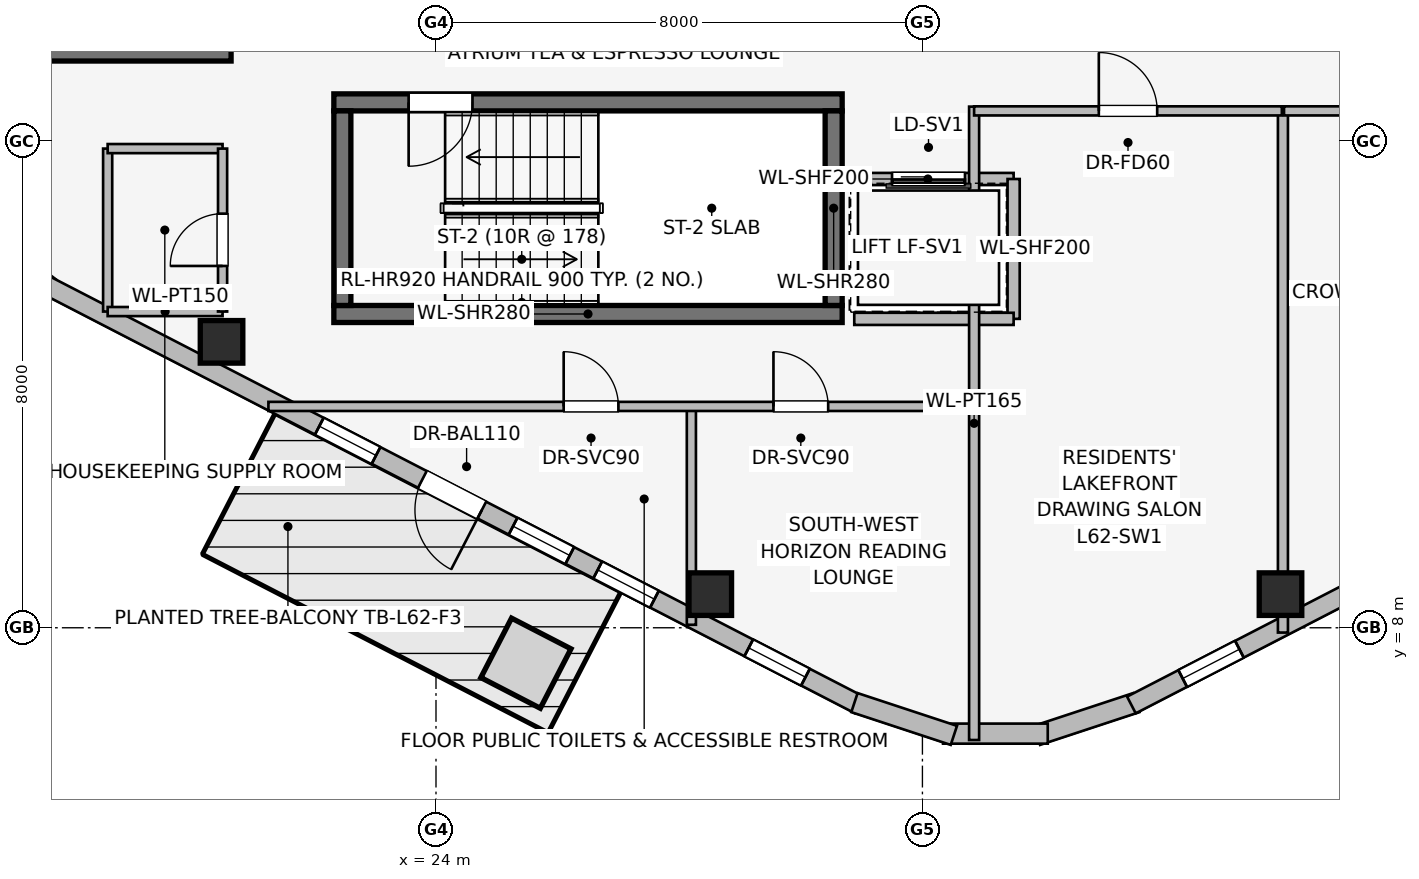
"""IFC4 building model, lengths in metres.
Left out: names, types, materials, properties, quantities, classifications, styles, units other than length and angle.
Written with IfcOpenShell. Run it as: python <this file> out.ifc"""

import sys

from ifc_helpers import new_model, si_unit, direction, frame, frame_2d, origin, origin_2d, place, context, subcontext, project, spatial, rectangle, extrude, element, fill, save


model = new_model("IFC4")
c1 = context("Model", 3, precision=1e-05, world=origin(), true_north=direction((0.0, 1.0)))
c2 = subcontext(c1, "Body", "Model", "MODEL_VIEW")
j1 = project(units=[si_unit("LENGTHUNIT", "METRE"), si_unit("PLANEANGLEUNIT", "RADIAN")], contexts=[c1])
p1 = place(None, origin())
s1 = spatial("IfcSite", under=j1, at=p1, CompositionType="ELEMENT")
p2 = place(p1, origin())
s2 = spatial("IfcBuilding", under=s1, at=p2, CompositionType="ELEMENT")
p3 = place(p2, frame((0.0, 0.0, 227.7)))
s3 = spatial("IfcBuildingStorey", under=s2, at=p3, CompositionType="ELEMENT", Elevation=227.7)
p4 = place(p3, frame((16.87, 17.46, 0.0), z_axis=(0.0, 0.0, 1.0), x_axis=(1.0, 0.0, 0.0)))
e1 = element("IfcWall", 1, at=p4, inside=s3, PredefinedType="SHEAR", context=c2, shape_type="SweptSolid", body=[
    extrude(rectangle(XDim=3.76, YDim=0.28, at=frame_2d((1.88, 0.0))), origin(), (0.0, 0.0, 1.0), 3.55),
])
p5 = place(p3, frame((22.32, 13.16, 0.0), z_axis=(0.0, 0.0, 1.0), x_axis=(1.0, 0.0, 0.0)))
e2 = element("IfcWall", 2, at=p5, inside=s3, PredefinedType="SHEAR", context=c2, shape_type="SweptSolid", body=[
    extrude(rectangle(XDim=8.36, YDim=0.28, at=frame_2d((4.18, 0.0))), origin(), (0.0, 0.0, 1.0), 3.55),
])
p6 = place(p3, frame((30.68, 16.64, 0.0), z_axis=(0.0, 0.0, 1.0), x_axis=(-1.0, 0.0, 0.0)))
e3 = element("IfcWall", 3, at=p6, inside=s3, PredefinedType="SHEAR", context=c2, shape_type="SweptSolid", body=[
    extrude(rectangle(XDim=8.36, YDim=0.28, at=frame_2d((4.18, 0.0))), origin(), (0.0, 0.0, 1.0), 3.55),
])
p7 = place(p6, frame((6.08, 0.0, 0.0)))
e4 = element("IfcOpeningElement", 4, at=p7, cuts=e3, PredefinedType="OPENING", context=c2, shape_type="SweptSolid", body=[
    extrude(rectangle(XDim=1.05, YDim=2.0, at=frame_2d((0.525, 1.0))), frame((0.0, 0.15, 0.0), z_axis=(0.0, -1.0, 0.0), x_axis=(1.0, 0.0, 0.0)), (0.0, 0.0, 1.0), 0.3),
])
for number, where, z_axis, x_axis in (
    (5, (22.46, 16.5, 0.0), (0.0, 0.0, 1.0), (0.0, -1.0, 0.0)),
    (6, (30.54, 13.3, 0.0), (0.0, 0.0, 1.0), (0.0, 1.0, 0.0)),
):
    element("IfcWall", number, at=place(p3, frame(where, z_axis=z_axis, x_axis=x_axis)), inside=s3, PredefinedType="SHEAR", context=c2, shape_type="SweptSolid", body=[
        extrude(rectangle(XDim=3.2, YDim=0.28, at=frame_2d((1.6, 0.0))), origin(), (0.0, 0.0, 1.0), 3.55),
    ])
for number, where, z_axis, x_axis in (
    (7, (20.473, 12.702, 0.0), (0.0, 0.0, 1.0), (1.0, 0.0, 0.0)),
    (8, (28.511, 8.553, 0.0), (0.0, 0.0, 1.0), (1.0, 0.0, 0.0)),
    (9, (37.889, 8.553, 0.0), (0.0, 0.0, 1.0), (1.0, 0.0, 0.0)),
):
    element("IfcColumn", number, at=place(p3, frame(where, z_axis=z_axis, x_axis=x_axis)), inside=s3, PredefinedType="COLUMN", context=c2, shape_type="SweptSolid", body=[
        extrude(rectangle(XDim=0.7, YDim=0.7, at=origin_2d()), origin(), (0.0, 0.0, 1.0), 3.55),
    ])
p8 = place(p3, frame((17.647, 13.599, 0.0), z_axis=(0.0, 0.0, 1.0), x_axis=(-0.790691856293, 0.61221433207, 0.0)))
e10 = element("IfcWall", 10, at=p8, inside=s3, PredefinedType="STANDARD", context=c2, shape_type="SweptSolid", body=[
    extrude(rectangle(XDim=1.676, YDim=0.33, at=frame_2d((0.838, 0.0))), origin(), (0.0, 0.0, 1.0), 3.29),
])
p9 = place(p3, frame((30.963, 6.73, 0.0), z_axis=(0.0, 0.0, 1.0), x_axis=(-0.888581481622, 0.458718814218, 0.0)))
e11 = element("IfcWall", 11, at=p9, inside=s3, PredefinedType="STANDARD", context=c2, shape_type="SweptSolid", body=[
    extrude(rectangle(XDim=15.077, YDim=0.31, at=frame_2d((7.539, 0.0))), origin(), (0.0, 0.0, 1.0), 3.29),
])
p10 = place(p9, frame((6.988, 0.0, 0.0)))
e12 = element("IfcOpeningElement", 12, at=p10, cuts=e11, PredefinedType="OPENING", context=c2, shape_type="SweptSolid", body=[
    extrude(rectangle(XDim=1.1, YDim=2.04, at=frame_2d((0.55, 1.02))), frame((0.0, 0.165, 0.0), z_axis=(0.0, -1.0, 0.0), x_axis=(1.0, 0.0, 0.0)), (0.0, 0.0, 1.0), 0.33),
])
p11 = place(p9, frame((0.998, 0.0, 0.75)))
e13 = element("IfcOpeningElement", 13, at=p11, cuts=e11, PredefinedType="OPENING", context=c2, shape_type="SweptSolid", body=[
    extrude(rectangle(XDim=1.05, YDim=1.4, at=frame_2d((0.525, 0.7))), frame((0.0, 0.165, 0.0), z_axis=(0.0, -1.0, 0.0), x_axis=(1.0, 0.0, 0.0)), (0.0, 0.0, 1.0), 0.33),
])
p12 = place(p9, frame((3.793, 0.0, 0.75)))
e14 = element("IfcOpeningElement", 14, at=p12, cuts=e11, PredefinedType="OPENING", context=c2, shape_type="SweptSolid", body=[
    extrude(rectangle(XDim=1.05, YDim=1.4, at=frame_2d((0.525, 0.7))), frame((0.0, 0.165, 0.0), z_axis=(0.0, -1.0, 0.0), x_axis=(1.0, 0.0, 0.0)), (0.0, 0.0, 1.0), 0.33),
])
p13 = place(p9, frame((5.36, 0.0, 0.75)))
e15 = element("IfcOpeningElement", 15, at=p13, cuts=e11, PredefinedType="OPENING", context=c2, shape_type="SweptSolid", body=[
    extrude(rectangle(XDim=1.05, YDim=1.4, at=frame_2d((0.525, 0.7))), frame((0.0, 0.165, 0.0), z_axis=(0.0, -1.0, 0.0), x_axis=(1.0, 0.0, 0.0)), (0.0, 0.0, 1.0), 0.33),
])
p14 = place(p9, frame((8.946, 0.0, 0.75)))
e16 = element("IfcOpeningElement", 16, at=p14, cuts=e11, PredefinedType="OPENING", context=c2, shape_type="SweptSolid", body=[
    extrude(rectangle(XDim=1.05, YDim=1.4, at=frame_2d((0.525, 0.7))), frame((0.0, 0.165, 0.0), z_axis=(0.0, -1.0, 0.0), x_axis=(1.0, 0.0, 0.0)), (0.0, 0.0, 1.0), 0.33),
])
p15 = place(p3, frame((35.518, 6.769, 0.0), z_axis=(0.0, 0.0, 1.0), x_axis=(-0.949713440491, -0.313120393699, 0.0)))
e17 = element("IfcWall", 17, at=p15, inside=s3, PredefinedType="STANDARD", context=c2, shape_type="SweptSolid", body=[
    extrude(rectangle(XDim=1.722, YDim=0.33, at=frame_2d((0.861, 0.0))), origin(), (0.0, 0.0, 1.0), 3.29),
])
p16 = place(p3, frame((34.061, 6.259, 0.0), z_axis=(0.0, 0.0, 1.0), x_axis=(-1.0, 0.0, 0.0)))
e18 = element("IfcWall", 18, at=p16, inside=s3, PredefinedType="STANDARD", context=c2, shape_type="SweptSolid", body=[
    extrude(rectangle(XDim=1.722, YDim=0.33, at=frame_2d((0.861, 0.0))), origin(), (0.0, 0.0, 1.0), 3.29),
])
p17 = place(p3, frame((32.517, 6.23, 0.0), z_axis=(0.0, 0.0, 1.0), x_axis=(-0.949713440491, 0.313120393699, 0.0)))
e19 = element("IfcWall", 19, at=p17, inside=s3, PredefinedType="STANDARD", context=c2, shape_type="SweptSolid", body=[
    extrude(rectangle(XDim=1.722, YDim=0.33, at=frame_2d((0.861, 0.0))), origin(), (0.0, 0.0, 1.0), 3.29),
])
p18 = place(p3, frame((39.188, 8.666, 0.0), z_axis=(0.0, 0.0, 1.0), x_axis=(-0.888616094641, -0.45865175934, 0.0)))
e20 = element("IfcWall", 20, at=p18, inside=s3, PredefinedType="STANDARD", context=c2, shape_type="SweptSolid", body=[
    extrude(rectangle(XDim=4.221, YDim=0.31, at=frame_2d((2.111, 0.0))), origin(), (0.0, 0.0, 1.0), 3.29),
])
p19 = place(p18, frame((2.222, 0.0, 0.75)))
e21 = element("IfcOpeningElement", 21, at=p19, cuts=e20, PredefinedType="OPENING", context=c2, shape_type="SweptSolid", body=[
    extrude(rectangle(XDim=1.05, YDim=1.4, at=frame_2d((0.525, 0.7))), frame((0.0, 0.165, 0.0), z_axis=(0.0, -1.0, 0.0), x_axis=(1.0, 0.0, 0.0)), (0.0, 0.0, 1.0), 0.33),
])
p20 = place(p3, frame((33.5, 15.38, 0.0), z_axis=(0.0, 0.0, 1.0), x_axis=(-1.0, 0.0, 0.0)))
e22 = element("IfcWall", 22, at=p20, inside=s3, PredefinedType="PARTITIONING", context=c2, shape_type="SweptSolid", body=[
    extrude(rectangle(XDim=2.82, YDim=0.2, at=frame_2d((1.41, 0.0))), origin(), (0.0, 0.0, 1.0), 3.29),
])
p21 = place(p20, frame((0.8, 0.0, 0.0)))
e23 = element("IfcOpeningElement", 23, at=p21, cuts=e22, PredefinedType="OPENING", context=c2, shape_type="SweptSolid", body=[
    extrude(rectangle(XDim=1.2, YDim=2.2, at=frame_2d((0.6, 1.1))), frame((0.0, 0.11, 0.0), z_axis=(0.0, -1.0, 0.0), x_axis=(1.0, 0.0, 0.0)), (0.0, 0.0, 1.0), 0.22),
])
p22 = place(p3, frame((33.5, 13.08, 0.0), z_axis=(0.0, 0.0, 1.0), x_axis=(0.0, 1.0, 0.0)))
e24 = element("IfcWall", 24, at=p22, inside=s3, PredefinedType="PARTITIONING", context=c2, shape_type="SweptSolid", body=[
    extrude(rectangle(XDim=2.3, YDim=0.2, at=frame_2d((1.15, 0.0))), origin(), (0.0, 0.0, 1.0), 3.29),
])
p23 = place(p3, frame((30.879, 13.08, 0.0), z_axis=(0.0, 0.0, 1.0), x_axis=(1.0, 0.0, 0.0)))
e25 = element("IfcWall", 25, at=p23, inside=s3, PredefinedType="PARTITIONING", context=c2, shape_type="SweptSolid", body=[
    extrude(rectangle(XDim=2.621, YDim=0.2, at=frame_2d((1.311, 0.0))), origin(), (0.0, 0.0, 1.0), 3.29),
])
p24 = place(p3, frame((18.6, 15.88, 0.0), z_axis=(0.0, 0.0, 1.0), x_axis=(0.0, -1.0, 0.0)))
e26 = element("IfcWall", 26, at=p24, inside=s3, PredefinedType="PARTITIONING", context=c2, shape_type="SweptSolid", body=[
    extrude(rectangle(XDim=2.68, YDim=0.15, at=frame_2d((1.34, 0.0))), origin(), (0.0, 0.0, 1.0), 3.29),
])
for number, where, z_axis, x_axis in (
    (27, (18.6, 13.2, 0.0), (0.0, 0.0, 1.0), (1.0, 0.0, 0.0)),
    (28, (18.6, 15.88, 0.0), (0.0, 0.0, 1.0), (1.0, 0.0, 0.0)),
):
    element("IfcWall", number, at=place(p3, frame(where, z_axis=z_axis, x_axis=x_axis)), inside=s3, PredefinedType="PARTITIONING", context=c2, shape_type="SweptSolid", body=[
        extrude(rectangle(XDim=1.89, YDim=0.15, at=frame_2d((0.945, 0.0))), origin(), (0.0, 0.0, 1.0), 3.29),
    ])
p25 = place(p3, frame((20.49, 13.2, 0.0), z_axis=(0.0, 0.0, 1.0), x_axis=(0.0, 1.0, 0.0)))
e29 = element("IfcWall", 29, at=p25, inside=s3, PredefinedType="PARTITIONING", context=c2, shape_type="SweptSolid", body=[
    extrude(rectangle(XDim=2.68, YDim=0.15, at=frame_2d((1.34, 0.0))), origin(), (0.0, 0.0, 1.0), 3.29),
])
p26 = place(p25, frame((0.75, 0.0, 0.0)))
e30 = element("IfcOpeningElement", 30, at=p26, cuts=e29, PredefinedType="OPENING", context=c2, shape_type="SweptSolid", body=[
    extrude(rectangle(XDim=0.86, YDim=2.0, at=frame_2d((0.43, 1.0))), frame((0.0, 0.085, 0.0), z_axis=(0.0, -1.0, 0.0), x_axis=(1.0, 0.0, 0.0)), (0.0, 0.0, 1.0), 0.17),
])
p27 = place(p3, frame((32.85, 6.154, 0.0), z_axis=(0.0, 0.0, 1.0), x_axis=(0.0, 1.0, 0.0)))
e31 = element("IfcWall", 31, at=p27, inside=s3, PredefinedType="PARTITIONING", context=c2, shape_type="SweptSolid", body=[
    extrude(rectangle(XDim=10.416, YDim=0.165, at=frame_2d((5.208, 0.0))), origin(), (0.0, 0.0, 1.0), 3.29),
])
p28 = place(p3, frame((28.2, 8.049, 0.0), z_axis=(0.0, 0.0, 1.0), x_axis=(0.0, 1.0, 0.0)))
e32 = element("IfcWall", 32, at=p28, inside=s3, PredefinedType="PARTITIONING", context=c2, shape_type="SweptSolid", body=[
    extrude(rectangle(XDim=3.591, YDim=0.15, at=frame_2d((1.795, 0.0))), origin(), (0.0, 0.0, 1.0), 3.29),
])
p29 = place(p3, frame((21.244, 11.64, 0.0), z_axis=(0.0, 0.0, 1.0), x_axis=(1.0, 0.0, 0.0)))
e33 = element("IfcWall", 33, at=p29, inside=s3, PredefinedType="PARTITIONING", context=c2, shape_type="SweptSolid", body=[
    extrude(rectangle(XDim=11.606, YDim=0.15, at=frame_2d((5.803, 0.0))), origin(), (0.0, 0.0, 1.0), 2.833),
])
p30 = place(p29, frame((4.856, 0.0, 0.0)))
e34 = element("IfcOpeningElement", 34, at=p30, cuts=e33, PredefinedType="OPENING", context=c2, shape_type="SweptSolid", body=[
    extrude(rectangle(XDim=0.9, YDim=2.0, at=frame_2d((0.45, 1.0))), frame((0.0, 0.085, 0.0), z_axis=(0.0, -1.0, 0.0), x_axis=(1.0, 0.0, 0.0)), (0.0, 0.0, 1.0), 0.17),
])
p31 = place(p29, frame((8.306, 0.0, 0.0)))
e35 = element("IfcOpeningElement", 35, at=p31, cuts=e33, PredefinedType="OPENING", context=c2, shape_type="SweptSolid", body=[
    extrude(rectangle(XDim=0.9, YDim=2.0, at=frame_2d((0.45, 1.0))), frame((0.0, 0.085, 0.0), z_axis=(0.0, -1.0, 0.0), x_axis=(1.0, 0.0, 0.0)), (0.0, 0.0, 1.0), 0.17),
])
p32 = place(p3, frame((37.929, 7.921, 0.0), z_axis=(0.0, 0.0, 1.0), x_axis=(0.0, 1.0, 0.0)))
e36 = element("IfcWall", 36, at=p32, inside=s3, PredefinedType="PARTITIONING", context=c2, shape_type="SweptSolid", body=[
    extrude(rectangle(XDim=8.549, YDim=0.165, at=frame_2d((4.274, 0.0))), origin(), (0.0, 0.0, 1.0), 2.679),
])
p33 = place(p3, frame((32.85, 16.5, 0.0), z_axis=(0.0, 0.0, 1.0), x_axis=(1.0, 0.0, 0.0)))
e37 = element("IfcWall", 37, at=p33, inside=s3, PredefinedType="PARTITIONING", context=c2, shape_type="SweptSolid", body=[
    extrude(rectangle(XDim=5.061, YDim=0.15, at=frame_2d((2.53, 0.0))), origin(), (0.0, 0.0, 1.0), 3.29),
])
p34 = place(p33, frame((2.051, 0.0, 0.0)))
e38 = element("IfcOpeningElement", 38, at=p34, cuts=e37, PredefinedType="OPENING", context=c2, shape_type="SweptSolid", body=[
    extrude(rectangle(XDim=0.96, YDim=2.0, at=frame_2d((0.48, 1.0))), frame((0.0, 0.085, 0.0), z_axis=(0.0, -1.0, 0.0), x_axis=(1.0, 0.0, 0.0)), (0.0, 0.0, 1.0), 0.17),
])
p35 = place(p3, frame((37.947, 16.5, 0.0), z_axis=(0.0, 0.0, 1.0), x_axis=(1.0, 0.0, 0.0)))
e39 = element("IfcWall", 39, at=p35, inside=s3, PredefinedType="PARTITIONING", context=c2, shape_type="SweptSolid", body=[
    extrude(rectangle(XDim=3.513, YDim=0.15, at=frame_2d((1.756, 0.0))), origin(), (0.0, 0.0, 1.0), 3.29),
])
p36 = place(p35, frame((1.277, 0.0, 0.0)))
e40 = element("IfcOpeningElement", 40, at=p36, cuts=e39, PredefinedType="OPENING", context=c2, shape_type="SweptSolid", body=[
    extrude(rectangle(XDim=0.96, YDim=2.0, at=frame_2d((0.48, 1.0))), frame((0.0, 0.085, 0.0), z_axis=(0.0, -1.0, 0.0), x_axis=(1.0, 0.0, 0.0)), (0.0, 0.0, 1.0), 0.17),
])
p37 = place(p10, origin())
e41 = element("IfcDoor", 41, at=p37, inside=s3, OperationType="SINGLE_SWING_LEFT", PredefinedType="DOOR", context=c2, shape_type="SweptSolid", body=[
    extrude(rectangle(XDim=1.1, YDim=2.04, at=frame_2d((0.55, 1.02))), frame((0.0, 0.025, 0.0), z_axis=(0.0, -1.0, 0.0), x_axis=(1.0, 0.0, 0.0)), (0.0, 0.0, 1.0), 0.05),
])
fill(e12, e41)
p38 = place(p11, origin())
e42 = element("IfcWindow", 42, at=p38, inside=s3, PartitioningType="SINGLE_PANEL", PredefinedType="WINDOW", context=c2, shape_type="SweptSolid", body=[
    extrude(rectangle(XDim=1.05, YDim=1.4, at=frame_2d((0.525, 0.7))), frame((0.0, 0.03, 0.0), z_axis=(0.0, -1.0, 0.0), x_axis=(1.0, 0.0, 0.0)), (0.0, 0.0, 1.0), 0.06),
])
fill(e13, e42)
p39 = place(p12, origin())
e43 = element("IfcWindow", 43, at=p39, inside=s3, PartitioningType="SINGLE_PANEL", PredefinedType="WINDOW", context=c2, shape_type="SweptSolid", body=[
    extrude(rectangle(XDim=1.05, YDim=1.4, at=frame_2d((0.525, 0.7))), frame((0.0, 0.03, 0.0), z_axis=(0.0, -1.0, 0.0), x_axis=(1.0, 0.0, 0.0)), (0.0, 0.0, 1.0), 0.06),
])
fill(e14, e43)
p40 = place(p13, origin())
e44 = element("IfcWindow", 44, at=p40, inside=s3, PartitioningType="SINGLE_PANEL", PredefinedType="WINDOW", context=c2, shape_type="SweptSolid", body=[
    extrude(rectangle(XDim=1.05, YDim=1.4, at=frame_2d((0.525, 0.7))), frame((0.0, 0.03, 0.0), z_axis=(0.0, -1.0, 0.0), x_axis=(1.0, 0.0, 0.0)), (0.0, 0.0, 1.0), 0.06),
])
fill(e15, e44)
p41 = place(p14, origin())
e45 = element("IfcWindow", 45, at=p41, inside=s3, PartitioningType="SINGLE_PANEL", PredefinedType="WINDOW", context=c2, shape_type="SweptSolid", body=[
    extrude(rectangle(XDim=1.05, YDim=1.4, at=frame_2d((0.525, 0.7))), frame((0.0, 0.03, 0.0), z_axis=(0.0, -1.0, 0.0), x_axis=(1.0, 0.0, 0.0)), (0.0, 0.0, 1.0), 0.06),
])
fill(e16, e45)
p42 = place(p19, origin())
e46 = element("IfcWindow", 46, at=p42, inside=s3, PartitioningType="SINGLE_PANEL", PredefinedType="WINDOW", context=c2, shape_type="SweptSolid", body=[
    extrude(rectangle(XDim=1.05, YDim=1.4, at=frame_2d((0.525, 0.7))), frame((0.0, 0.03, 0.0), z_axis=(0.0, -1.0, 0.0), x_axis=(1.0, 0.0, 0.0)), (0.0, 0.0, 1.0), 0.06),
])
fill(e21, e46)
p43 = place(p7, origin())
e47 = element("IfcDoor", 47, at=p43, inside=s3, OperationType="SINGLE_SWING_RIGHT", PredefinedType="DOOR", context=c2, shape_type="SweptSolid", body=[
    extrude(rectangle(XDim=1.05, YDim=2.0, at=frame_2d((0.525, 1.0))), frame((0.0, 0.025, 0.0), z_axis=(0.0, -1.0, 0.0), x_axis=(1.0, 0.0, 0.0)), (0.0, 0.0, 1.0), 0.05),
])
fill(e4, e47)
p44 = place(p21, origin())
e48 = element("IfcDoor", 48, at=p44, inside=s3, OperationType="SLIDING_TO_RIGHT", PredefinedType="DOOR", context=c2, shape_type="SweptSolid", body=[
    extrude(rectangle(XDim=1.2, YDim=2.2, at=frame_2d((0.6, 1.1))), frame((0.0, 0.025, 0.0), z_axis=(0.0, -1.0, 0.0), x_axis=(1.0, 0.0, 0.0)), (0.0, 0.0, 1.0), 0.05),
])
fill(e23, e48)
p45 = place(p26, origin())
e49 = element("IfcDoor", 49, at=p45, inside=s3, OperationType="SINGLE_SWING_LEFT", PredefinedType="DOOR", context=c2, shape_type="SweptSolid", body=[
    extrude(rectangle(XDim=0.86, YDim=2.0, at=frame_2d((0.43, 1.0))), frame((0.0, 0.025, 0.0), z_axis=(0.0, -1.0, 0.0), x_axis=(1.0, 0.0, 0.0)), (0.0, 0.0, 1.0), 0.05),
])
fill(e30, e49)
p46 = place(p30, origin())
e50 = element("IfcDoor", 50, at=p46, inside=s3, OperationType="SINGLE_SWING_LEFT", PredefinedType="DOOR", context=c2, shape_type="SweptSolid", body=[
    extrude(rectangle(XDim=0.9, YDim=2.0, at=frame_2d((0.45, 1.0))), frame((0.0, 0.025, 0.0), z_axis=(0.0, -1.0, 0.0), x_axis=(1.0, 0.0, 0.0)), (0.0, 0.0, 1.0), 0.05),
])
fill(e34, e50)
p47 = place(p31, origin())
e51 = element("IfcDoor", 51, at=p47, inside=s3, OperationType="SINGLE_SWING_LEFT", PredefinedType="DOOR", context=c2, shape_type="SweptSolid", body=[
    extrude(rectangle(XDim=0.9, YDim=2.0, at=frame_2d((0.45, 1.0))), frame((0.0, 0.025, 0.0), z_axis=(0.0, -1.0, 0.0), x_axis=(1.0, 0.0, 0.0)), (0.0, 0.0, 1.0), 0.05),
])
fill(e35, e51)
p48 = place(p34, origin())
e52 = element("IfcDoor", 52, at=p48, inside=s3, OperationType="SINGLE_SWING_LEFT", PredefinedType="DOOR", context=c2, shape_type="SweptSolid", body=[
    extrude(rectangle(XDim=0.96, YDim=2.0, at=frame_2d((0.48, 1.0))), frame((0.0, 0.025, 0.0), z_axis=(0.0, -1.0, 0.0), x_axis=(1.0, 0.0, 0.0)), (0.0, 0.0, 1.0), 0.05),
])
fill(e38, e52)
save(model, sys.argv[1])
